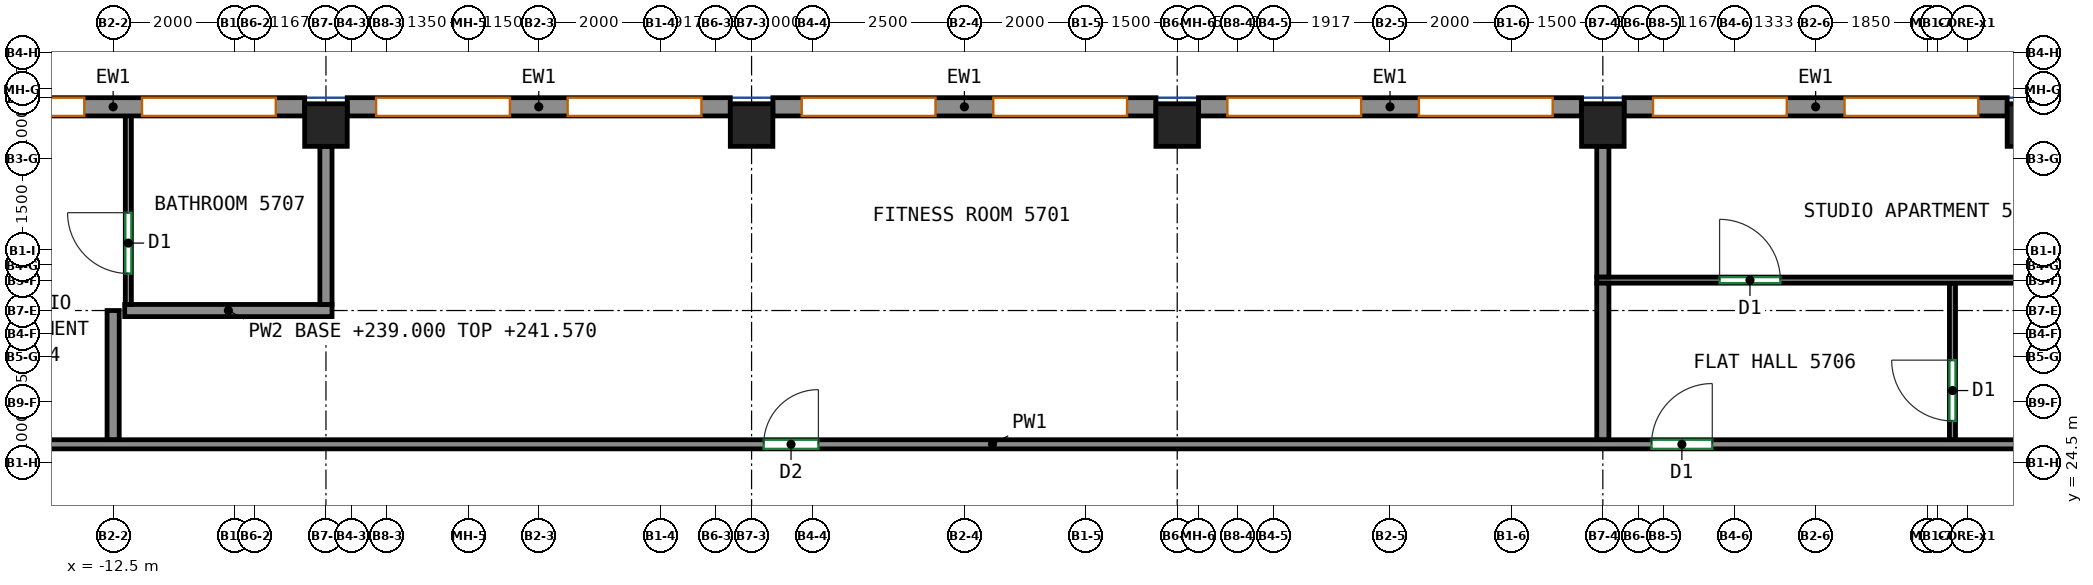
"""IFC4 building model, lengths in metres.
Left out: names, types, materials, properties, quantities, classifications, styles, units other than length and angle.
Written with IfcOpenShell. Run it as: python <this file> out.ifc"""

import sys

from ifc_helpers import new_model, si_unit, direction, frame, frame_2d, origin, origin_2d, place, context, subcontext, project, spatial, rectangle, extrude, source, transform, mapped, element, fill, save


model = new_model("IFC4")
c1 = context("Model", 3, precision=1e-05, world=origin(), true_north=direction((0.0, 1.0)))
c2 = subcontext(c1, "Body", "Model", "MODEL_VIEW")
j1 = project(units=[si_unit("LENGTHUNIT", "METRE"), si_unit("PLANEANGLEUNIT", "RADIAN")], contexts=[c1])
p1 = place(None, origin())
s1 = spatial("IfcSite", under=j1, at=p1, CompositionType="ELEMENT")
p2 = place(p1, origin())
s2 = spatial("IfcBuilding", under=s1, at=p2, CompositionType="ELEMENT")
p3 = place(p2, frame((0.0, 0.0, 239.0)))
s3 = spatial("IfcBuildingStorey", under=s2, at=p3, CompositionType="ELEMENT", Elevation=239.0)
m1 = source(origin(), c2, "Body", "SweptSolid", [
    extrude(rectangle(XDim=0.7, YDim=0.7, at=origin_2d()), origin(), (0.0, 0.0, 1.0), 3.12),
])
for number, where, z_axis, x_axis in (
    (1, (-9.0, 30.05, 0.0), (0.0, 0.0, 1.0), (1.0, 0.0, 0.0)),
    (2, (-2.0, 30.05, 0.0), (0.0, 0.0, 1.0), (1.0, 0.0, 0.0)),
    (3, (5.0, 30.05, 0.0), (0.0, 0.0, 1.0), (1.0, 0.0, 0.0)),
    (4, (12.0, 30.05, 0.0), (0.0, 0.0, 1.0), (1.0, 0.0, 0.0)),
    (5, (19.0, 30.05, 0.0), (0.0, 0.0, 1.0), (1.0, 0.0, 0.0)),
):
    element("IfcColumn", number, at=place(p3, frame(where, z_axis=z_axis, x_axis=x_axis)), inside=s3, PredefinedType="COLUMN", context=c2, shape_type="MappedRepresentation", body=[
        mapped(m1, transform((0.0, 0.0, 0.0))),
    ])
m2 = source(origin(), c2, "Body", "SweptSolid", [
    extrude(rectangle(XDim=6.3, YDim=0.3, at=frame_2d((3.15, 0.0))), origin(), (0.0, 0.0, 1.0), 3.12),
])
p4 = place(p3, frame((18.65, 30.35, 0.0), z_axis=(0.0, 0.0, 1.0), x_axis=(-1.0, 0.0, 0.0)))
e6 = element("IfcWall", 6, at=p4, inside=s3, PredefinedType="SOLIDWALL", context=c2, shape_type="MappedRepresentation", body=[
    mapped(m2, transform((0.0, 0.0, 0.0))),
])
p5 = place(p4, frame((0.475, 0.0, 0.8)))
e7 = element("IfcOpeningElement", 7, at=p5, cuts=e6, PredefinedType="OPENING", context=c2, shape_type="SweptSolid", body=[
    extrude(rectangle(XDim=2.2, YDim=2.05, at=frame_2d((1.1, 1.025))), frame((0.0, 0.16, 0.0), z_axis=(0.0, -1.0, 0.0), x_axis=(1.0, 0.0, 0.0)), (0.0, 0.0, 1.0), 0.32),
])
p6 = place(p4, frame((3.625, 0.0, 0.8)))
e8 = element("IfcOpeningElement", 8, at=p6, cuts=e6, PredefinedType="OPENING", context=c2, shape_type="SweptSolid", body=[
    extrude(rectangle(XDim=2.2, YDim=2.05, at=frame_2d((1.1, 1.025))), frame((0.0, 0.16, 0.0), z_axis=(0.0, -1.0, 0.0), x_axis=(1.0, 0.0, 0.0)), (0.0, 0.0, 1.0), 0.32),
])
p7 = place(p3, frame((11.65, 30.35, 0.0), z_axis=(0.0, 0.0, 1.0), x_axis=(-1.0, 0.0, 0.0)))
e9 = element("IfcWall", 9, at=p7, inside=s3, PredefinedType="SOLIDWALL", context=c2, shape_type="MappedRepresentation", body=[
    mapped(m2, transform((0.0, 0.0, 0.0))),
])
p8 = place(p7, frame((0.475, 0.0, 0.8)))
e10 = element("IfcOpeningElement", 10, at=p8, cuts=e9, PredefinedType="OPENING", context=c2, shape_type="SweptSolid", body=[
    extrude(rectangle(XDim=2.2, YDim=2.05, at=frame_2d((1.1, 1.025))), frame((0.0, 0.16, 0.0), z_axis=(0.0, -1.0, 0.0), x_axis=(1.0, 0.0, 0.0)), (0.0, 0.0, 1.0), 0.32),
])
p9 = place(p7, frame((3.625, 0.0, 0.8)))
e11 = element("IfcOpeningElement", 11, at=p9, cuts=e9, PredefinedType="OPENING", context=c2, shape_type="SweptSolid", body=[
    extrude(rectangle(XDim=2.2, YDim=2.05, at=frame_2d((1.1, 1.025))), frame((0.0, 0.16, 0.0), z_axis=(0.0, -1.0, 0.0), x_axis=(1.0, 0.0, 0.0)), (0.0, 0.0, 1.0), 0.32),
])
p10 = place(p3, frame((4.65, 30.35, 0.0), z_axis=(0.0, 0.0, 1.0), x_axis=(-1.0, 0.0, 0.0)))
e12 = element("IfcWall", 12, at=p10, inside=s3, PredefinedType="SOLIDWALL", context=c2, shape_type="MappedRepresentation", body=[
    mapped(m2, transform((0.0, 0.0, 0.0))),
])
p11 = place(p10, frame((0.475, 0.0, 0.8)))
e13 = element("IfcOpeningElement", 13, at=p11, cuts=e12, PredefinedType="OPENING", context=c2, shape_type="SweptSolid", body=[
    extrude(rectangle(XDim=2.2, YDim=2.05, at=frame_2d((1.1, 1.025))), frame((0.0, 0.16, 0.0), z_axis=(0.0, -1.0, 0.0), x_axis=(1.0, 0.0, 0.0)), (0.0, 0.0, 1.0), 0.32),
])
p12 = place(p10, frame((3.625, 0.0, 0.8)))
e14 = element("IfcOpeningElement", 14, at=p12, cuts=e12, PredefinedType="OPENING", context=c2, shape_type="SweptSolid", body=[
    extrude(rectangle(XDim=2.2, YDim=2.05, at=frame_2d((1.1, 1.025))), frame((0.0, 0.16, 0.0), z_axis=(0.0, -1.0, 0.0), x_axis=(1.0, 0.0, 0.0)), (0.0, 0.0, 1.0), 0.32),
])
p13 = place(p3, frame((-2.35, 30.35, 0.0), z_axis=(0.0, 0.0, 1.0), x_axis=(-1.0, 0.0, 0.0)))
e15 = element("IfcWall", 15, at=p13, inside=s3, PredefinedType="SOLIDWALL", context=c2, shape_type="MappedRepresentation", body=[
    mapped(m2, transform((0.0, 0.0, 0.0))),
])
p14 = place(p13, frame((0.475, 0.0, 0.8)))
e16 = element("IfcOpeningElement", 16, at=p14, cuts=e15, PredefinedType="OPENING", context=c2, shape_type="SweptSolid", body=[
    extrude(rectangle(XDim=2.2, YDim=2.05, at=frame_2d((1.1, 1.025))), frame((0.0, 0.16, 0.0), z_axis=(0.0, -1.0, 0.0), x_axis=(1.0, 0.0, 0.0)), (0.0, 0.0, 1.0), 0.32),
])
p15 = place(p13, frame((3.625, 0.0, 0.8)))
e17 = element("IfcOpeningElement", 17, at=p15, cuts=e15, PredefinedType="OPENING", context=c2, shape_type="SweptSolid", body=[
    extrude(rectangle(XDim=2.2, YDim=2.05, at=frame_2d((1.1, 1.025))), frame((0.0, 0.16, 0.0), z_axis=(0.0, -1.0, 0.0), x_axis=(1.0, 0.0, 0.0)), (0.0, 0.0, 1.0), 0.32),
])
p16 = place(p3, frame((-9.35, 30.35, 0.0), z_axis=(0.0, 0.0, 1.0), x_axis=(-1.0, 0.0, 0.0)))
e18 = element("IfcWall", 18, at=p16, inside=s3, PredefinedType="SOLIDWALL", context=c2, shape_type="MappedRepresentation", body=[
    mapped(m2, transform((0.0, 0.0, 0.0))),
])
p17 = place(p16, frame((0.475, 0.0, 0.8)))
e19 = element("IfcOpeningElement", 19, at=p17, cuts=e18, PredefinedType="OPENING", context=c2, shape_type="SweptSolid", body=[
    extrude(rectangle(XDim=2.2, YDim=2.05, at=frame_2d((1.1, 1.025))), frame((0.0, 0.16, 0.0), z_axis=(0.0, -1.0, 0.0), x_axis=(1.0, 0.0, 0.0)), (0.0, 0.0, 1.0), 0.32),
])
p18 = place(p16, frame((3.625, 0.0, 0.8)))
e20 = element("IfcOpeningElement", 20, at=p18, cuts=e18, PredefinedType="OPENING", context=c2, shape_type="SweptSolid", body=[
    extrude(rectangle(XDim=2.2, YDim=2.05, at=frame_2d((1.1, 1.025))), frame((0.0, 0.16, 0.0), z_axis=(0.0, -1.0, 0.0), x_axis=(1.0, 0.0, 0.0)), (0.0, 0.0, 1.0), 0.32),
])
p19 = place(p3, frame((-16.075, 24.8, 0.0), z_axis=(0.0, 0.0, 1.0), x_axis=(1.0, 0.0, 0.0)))
e21 = element("IfcWall", 21, at=p19, inside=s3, PredefinedType="PARTITIONING", context=c2, shape_type="SweptSolid", body=[
    extrude(rectangle(XDim=36.073, YDim=0.15, at=frame_2d((18.037, 0.0))), origin(), (0.0, 0.0, 1.0), 3.12),
])
p20 = place(p19, frame((14.274, 0.0, 0.0)))
e22 = element("IfcOpeningElement", 22, at=p20, cuts=e21, PredefinedType="OPENING", context=c2, shape_type="SweptSolid", body=[
    extrude(rectangle(XDim=0.9, YDim=2.1, at=frame_2d((0.45, 1.05))), frame((0.0, 0.085, 0.0), z_axis=(0.0, -1.0, 0.0), x_axis=(1.0, 0.0, 0.0)), (0.0, 0.0, 1.0), 0.17),
])
p21 = place(p19, frame((28.875, 0.0, 0.0)))
e23 = element("IfcOpeningElement", 23, at=p21, cuts=e21, PredefinedType="OPENING", context=c2, shape_type="SweptSolid", body=[
    extrude(rectangle(XDim=1.0, YDim=2.1, at=frame_2d((0.5, 1.05))), frame((0.0, 0.085, 0.0), z_axis=(0.0, -1.0, 0.0), x_axis=(1.0, 0.0, 0.0)), (0.0, 0.0, 1.0), 0.17),
])
p22 = place(p3, frame((17.75, 24.877, 0.0), z_axis=(0.0, 0.0, 1.0), x_axis=(0.0, 1.0, 0.0)))
e24 = element("IfcWall", 24, at=p22, inside=s3, PredefinedType="PARTITIONING", context=c2, shape_type="SweptSolid", body=[
    extrude(rectangle(XDim=2.573, YDim=0.1, at=frame_2d((1.287, 0.0))), origin(), (0.0, 0.0, 1.0), 3.12),
])
p23 = place(p22, frame((0.307, 0.0, 0.0)))
e25 = element("IfcOpeningElement", 25, at=p23, cuts=e24, PredefinedType="OPENING", context=c2, shape_type="SweptSolid", body=[
    extrude(rectangle(XDim=1.0, YDim=2.1, at=frame_2d((0.5, 1.05))), frame((0.0, 0.06, 0.0), z_axis=(0.0, -1.0, 0.0), x_axis=(1.0, 0.0, 0.0)), (0.0, 0.0, 1.0), 0.12),
])
p24 = place(p3, frame((11.9, 27.5, 0.0), z_axis=(0.0, 0.0, 1.0), x_axis=(1.0, 0.0, 0.0)))
e26 = element("IfcWall", 26, at=p24, inside=s3, PredefinedType="PARTITIONING", context=c2, shape_type="SweptSolid", body=[
    extrude(rectangle(XDim=10.66, YDim=0.1, at=frame_2d((5.33, 0.0))), origin(), (0.0, 0.0, 1.0), 3.12),
])
p25 = place(p24, frame((2.02, 0.0, 0.0)))
e27 = element("IfcOpeningElement", 27, at=p25, cuts=e26, PredefinedType="OPENING", context=c2, shape_type="SweptSolid", body=[
    extrude(rectangle(XDim=1.0, YDim=2.1, at=frame_2d((0.5, 1.05))), frame((0.0, 0.06, 0.0), z_axis=(0.0, -1.0, 0.0), x_axis=(1.0, 0.0, 0.0)), (0.0, 0.0, 1.0), 0.12),
])
p26 = place(p3, frame((12.0, 24.877, 0.0), z_axis=(0.0, 0.0, 1.0), x_axis=(0.0, 1.0, 0.0)))
e28 = element("IfcWall", 28, at=p26, inside=s3, PredefinedType="PARTITIONING", context=c2, shape_type="SweptSolid", body=[
    extrude(rectangle(XDim=2.573, YDim=0.2, at=frame_2d((1.287, 0.0))), origin(), (0.0, 0.0, 1.0), 3.12),
])
p27 = place(p3, frame((12.0, 27.552, 0.0), z_axis=(0.0, 0.0, 1.0), x_axis=(0.0, 1.0, 0.0)))
e29 = element("IfcWall", 29, at=p27, inside=s3, PredefinedType="PARTITIONING", context=c2, shape_type="SweptSolid", body=[
    extrude(rectangle(XDim=2.148, YDim=0.2, at=frame_2d((1.074, 0.0))), origin(), (0.0, 0.0, 1.0), 3.12),
])
p28 = place(p3, frame((-12.5, 27.0, 0.0), z_axis=(0.0, 0.0, 1.0), x_axis=(0.0, -1.0, 0.0)))
e30 = element("IfcWall", 30, at=p28, inside=s3, PredefinedType="PARTITIONING", context=c2, shape_type="SweptSolid", body=[
    extrude(rectangle(XDim=2.123, YDim=0.2, at=frame_2d((1.062, 0.0))), origin(), (0.0, 0.0, 1.0), 3.12),
])
p29 = place(p3, frame((-8.9, 27.0, 0.0), z_axis=(0.0, 0.0, 1.0), x_axis=(-1.0, 0.0, 0.0)))
e31 = element("IfcWall", 31, at=p29, inside=s3, PredefinedType="PARTITIONING", context=c2, shape_type="SweptSolid", body=[
    extrude(rectangle(XDim=3.41, YDim=0.2, at=frame_2d((1.705, 0.0))), origin(), (0.0, 0.0, 1.0), 2.57),
])
p30 = place(p3, frame((-9.0, 27.1, 0.0), z_axis=(0.0, 0.0, 1.0), x_axis=(0.0, 1.0, 0.0)))
e32 = element("IfcWall", 32, at=p30, inside=s3, PredefinedType="PARTITIONING", context=c2, shape_type="SweptSolid", body=[
    extrude(rectangle(XDim=2.6, YDim=0.2, at=frame_2d((1.3, 0.0))), origin(), (0.0, 0.0, 1.0), 3.12),
])
p31 = place(p3, frame((-12.25, 27.1, 0.0), z_axis=(0.0, 0.0, 1.0), x_axis=(0.0, 1.0, 0.0)))
e33 = element("IfcWall", 33, at=p31, inside=s3, PredefinedType="PARTITIONING", context=c2, shape_type="SweptSolid", body=[
    extrude(rectangle(XDim=3.15, YDim=0.1, at=frame_2d((1.575, 0.0))), origin(), (0.0, 0.0, 1.0), 3.12),
])
p32 = place(p31, frame((0.509, 0.0, 0.0)))
e34 = element("IfcOpeningElement", 34, at=p32, cuts=e33, PredefinedType="OPENING", context=c2, shape_type="SweptSolid", body=[
    extrude(rectangle(XDim=1.0, YDim=2.1, at=frame_2d((0.5, 1.05))), frame((0.0, 0.06, 0.0), z_axis=(0.0, -1.0, 0.0), x_axis=(1.0, 0.0, 0.0)), (0.0, 0.0, 1.0), 0.12),
])
p33 = place(p5, origin())
e35 = element("IfcWindow", 35, at=p33, inside=s3, PartitioningType="SINGLE_PANEL", PredefinedType="WINDOW", context=c2, shape_type="SweptSolid", body=[
    extrude(rectangle(XDim=2.2, YDim=2.05, at=frame_2d((1.1, 1.025))), frame((0.0, 0.03, 0.0), z_axis=(0.0, -1.0, 0.0), x_axis=(1.0, 0.0, 0.0)), (0.0, 0.0, 1.0), 0.06),
])
fill(e7, e35)
p34 = place(p6, origin())
e36 = element("IfcWindow", 36, at=p34, inside=s3, PartitioningType="SINGLE_PANEL", PredefinedType="WINDOW", context=c2, shape_type="SweptSolid", body=[
    extrude(rectangle(XDim=2.2, YDim=2.05, at=frame_2d((1.1, 1.025))), frame((0.0, 0.03, 0.0), z_axis=(0.0, -1.0, 0.0), x_axis=(1.0, 0.0, 0.0)), (0.0, 0.0, 1.0), 0.06),
])
fill(e8, e36)
p35 = place(p8, origin())
e37 = element("IfcWindow", 37, at=p35, inside=s3, PartitioningType="SINGLE_PANEL", PredefinedType="WINDOW", context=c2, shape_type="SweptSolid", body=[
    extrude(rectangle(XDim=2.2, YDim=2.05, at=frame_2d((1.1, 1.025))), frame((0.0, 0.03, 0.0), z_axis=(0.0, -1.0, 0.0), x_axis=(1.0, 0.0, 0.0)), (0.0, 0.0, 1.0), 0.06),
])
fill(e10, e37)
p36 = place(p9, origin())
e38 = element("IfcWindow", 38, at=p36, inside=s3, PartitioningType="SINGLE_PANEL", PredefinedType="WINDOW", context=c2, shape_type="SweptSolid", body=[
    extrude(rectangle(XDim=2.2, YDim=2.05, at=frame_2d((1.1, 1.025))), frame((0.0, 0.03, 0.0), z_axis=(0.0, -1.0, 0.0), x_axis=(1.0, 0.0, 0.0)), (0.0, 0.0, 1.0), 0.06),
])
fill(e11, e38)
p37 = place(p11, origin())
e39 = element("IfcWindow", 39, at=p37, inside=s3, PartitioningType="SINGLE_PANEL", PredefinedType="WINDOW", context=c2, shape_type="SweptSolid", body=[
    extrude(rectangle(XDim=2.2, YDim=2.05, at=frame_2d((1.1, 1.025))), frame((0.0, 0.03, 0.0), z_axis=(0.0, -1.0, 0.0), x_axis=(1.0, 0.0, 0.0)), (0.0, 0.0, 1.0), 0.06),
])
fill(e13, e39)
p38 = place(p12, origin())
e40 = element("IfcWindow", 40, at=p38, inside=s3, PartitioningType="SINGLE_PANEL", PredefinedType="WINDOW", context=c2, shape_type="SweptSolid", body=[
    extrude(rectangle(XDim=2.2, YDim=2.05, at=frame_2d((1.1, 1.025))), frame((0.0, 0.03, 0.0), z_axis=(0.0, -1.0, 0.0), x_axis=(1.0, 0.0, 0.0)), (0.0, 0.0, 1.0), 0.06),
])
fill(e14, e40)
p39 = place(p14, origin())
e41 = element("IfcWindow", 41, at=p39, inside=s3, PartitioningType="SINGLE_PANEL", PredefinedType="WINDOW", context=c2, shape_type="SweptSolid", body=[
    extrude(rectangle(XDim=2.2, YDim=2.05, at=frame_2d((1.1, 1.025))), frame((0.0, 0.03, 0.0), z_axis=(0.0, -1.0, 0.0), x_axis=(1.0, 0.0, 0.0)), (0.0, 0.0, 1.0), 0.06),
])
fill(e16, e41)
p40 = place(p15, origin())
e42 = element("IfcWindow", 42, at=p40, inside=s3, PartitioningType="SINGLE_PANEL", PredefinedType="WINDOW", context=c2, shape_type="SweptSolid", body=[
    extrude(rectangle(XDim=2.2, YDim=2.05, at=frame_2d((1.1, 1.025))), frame((0.0, 0.03, 0.0), z_axis=(0.0, -1.0, 0.0), x_axis=(1.0, 0.0, 0.0)), (0.0, 0.0, 1.0), 0.06),
])
fill(e17, e42)
p41 = place(p17, origin())
e43 = element("IfcWindow", 43, at=p41, inside=s3, PartitioningType="SINGLE_PANEL", PredefinedType="WINDOW", context=c2, shape_type="SweptSolid", body=[
    extrude(rectangle(XDim=2.2, YDim=2.05, at=frame_2d((1.1, 1.025))), frame((0.0, 0.03, 0.0), z_axis=(0.0, -1.0, 0.0), x_axis=(1.0, 0.0, 0.0)), (0.0, 0.0, 1.0), 0.06),
])
fill(e19, e43)
p42 = place(p18, origin())
e44 = element("IfcWindow", 44, at=p42, inside=s3, PartitioningType="SINGLE_PANEL", PredefinedType="WINDOW", context=c2, shape_type="SweptSolid", body=[
    extrude(rectangle(XDim=2.2, YDim=2.05, at=frame_2d((1.1, 1.025))), frame((0.0, 0.03, 0.0), z_axis=(0.0, -1.0, 0.0), x_axis=(1.0, 0.0, 0.0)), (0.0, 0.0, 1.0), 0.06),
])
fill(e20, e44)
p43 = place(p20, origin())
e45 = element("IfcDoor", 45, at=p43, inside=s3, OperationType="SINGLE_SWING_RIGHT", PredefinedType="DOOR", context=c2, shape_type="SweptSolid", body=[
    extrude(rectangle(XDim=0.9, YDim=2.1, at=frame_2d((0.45, 1.05))), frame((0.0, 0.025, 0.0), z_axis=(0.0, -1.0, 0.0), x_axis=(1.0, 0.0, 0.0)), (0.0, 0.0, 1.0), 0.05),
])
fill(e22, e45)
p44 = place(p21, origin())
e46 = element("IfcDoor", 46, at=p44, inside=s3, OperationType="SINGLE_SWING_RIGHT", PredefinedType="DOOR", context=c2, shape_type="SweptSolid", body=[
    extrude(rectangle(XDim=1.0, YDim=2.1, at=frame_2d((0.5, 1.05))), frame((0.0, 0.025, 0.0), z_axis=(0.0, -1.0, 0.0), x_axis=(1.0, 0.0, 0.0)), (0.0, 0.0, 1.0), 0.05),
])
fill(e23, e46)
p45 = place(p23, origin())
e47 = element("IfcDoor", 47, at=p45, inside=s3, OperationType="SINGLE_SWING_RIGHT", PredefinedType="DOOR", context=c2, shape_type="SweptSolid", body=[
    extrude(rectangle(XDim=1.0, YDim=2.1, at=frame_2d((0.5, 1.05))), frame((0.0, 0.025, 0.0), z_axis=(0.0, -1.0, 0.0), x_axis=(1.0, 0.0, 0.0)), (0.0, 0.0, 1.0), 0.05),
])
fill(e25, e47)
p46 = place(p25, origin())
e48 = element("IfcDoor", 48, at=p46, inside=s3, OperationType="SINGLE_SWING_LEFT", PredefinedType="DOOR", context=c2, shape_type="SweptSolid", body=[
    extrude(rectangle(XDim=1.0, YDim=2.1, at=frame_2d((0.5, 1.05))), frame((0.0, 0.025, 0.0), z_axis=(0.0, -1.0, 0.0), x_axis=(1.0, 0.0, 0.0)), (0.0, 0.0, 1.0), 0.05),
])
fill(e27, e48)
p47 = place(p32, origin())
e49 = element("IfcDoor", 49, at=p47, inside=s3, OperationType="SINGLE_SWING_RIGHT", PredefinedType="DOOR", context=c2, shape_type="SweptSolid", body=[
    extrude(rectangle(XDim=1.0, YDim=2.1, at=frame_2d((0.5, 1.05))), frame((0.0, 0.025, 0.0), z_axis=(0.0, -1.0, 0.0), x_axis=(1.0, 0.0, 0.0)), (0.0, 0.0, 1.0), 0.05),
])
fill(e34, e49)
save(model, sys.argv[1])
